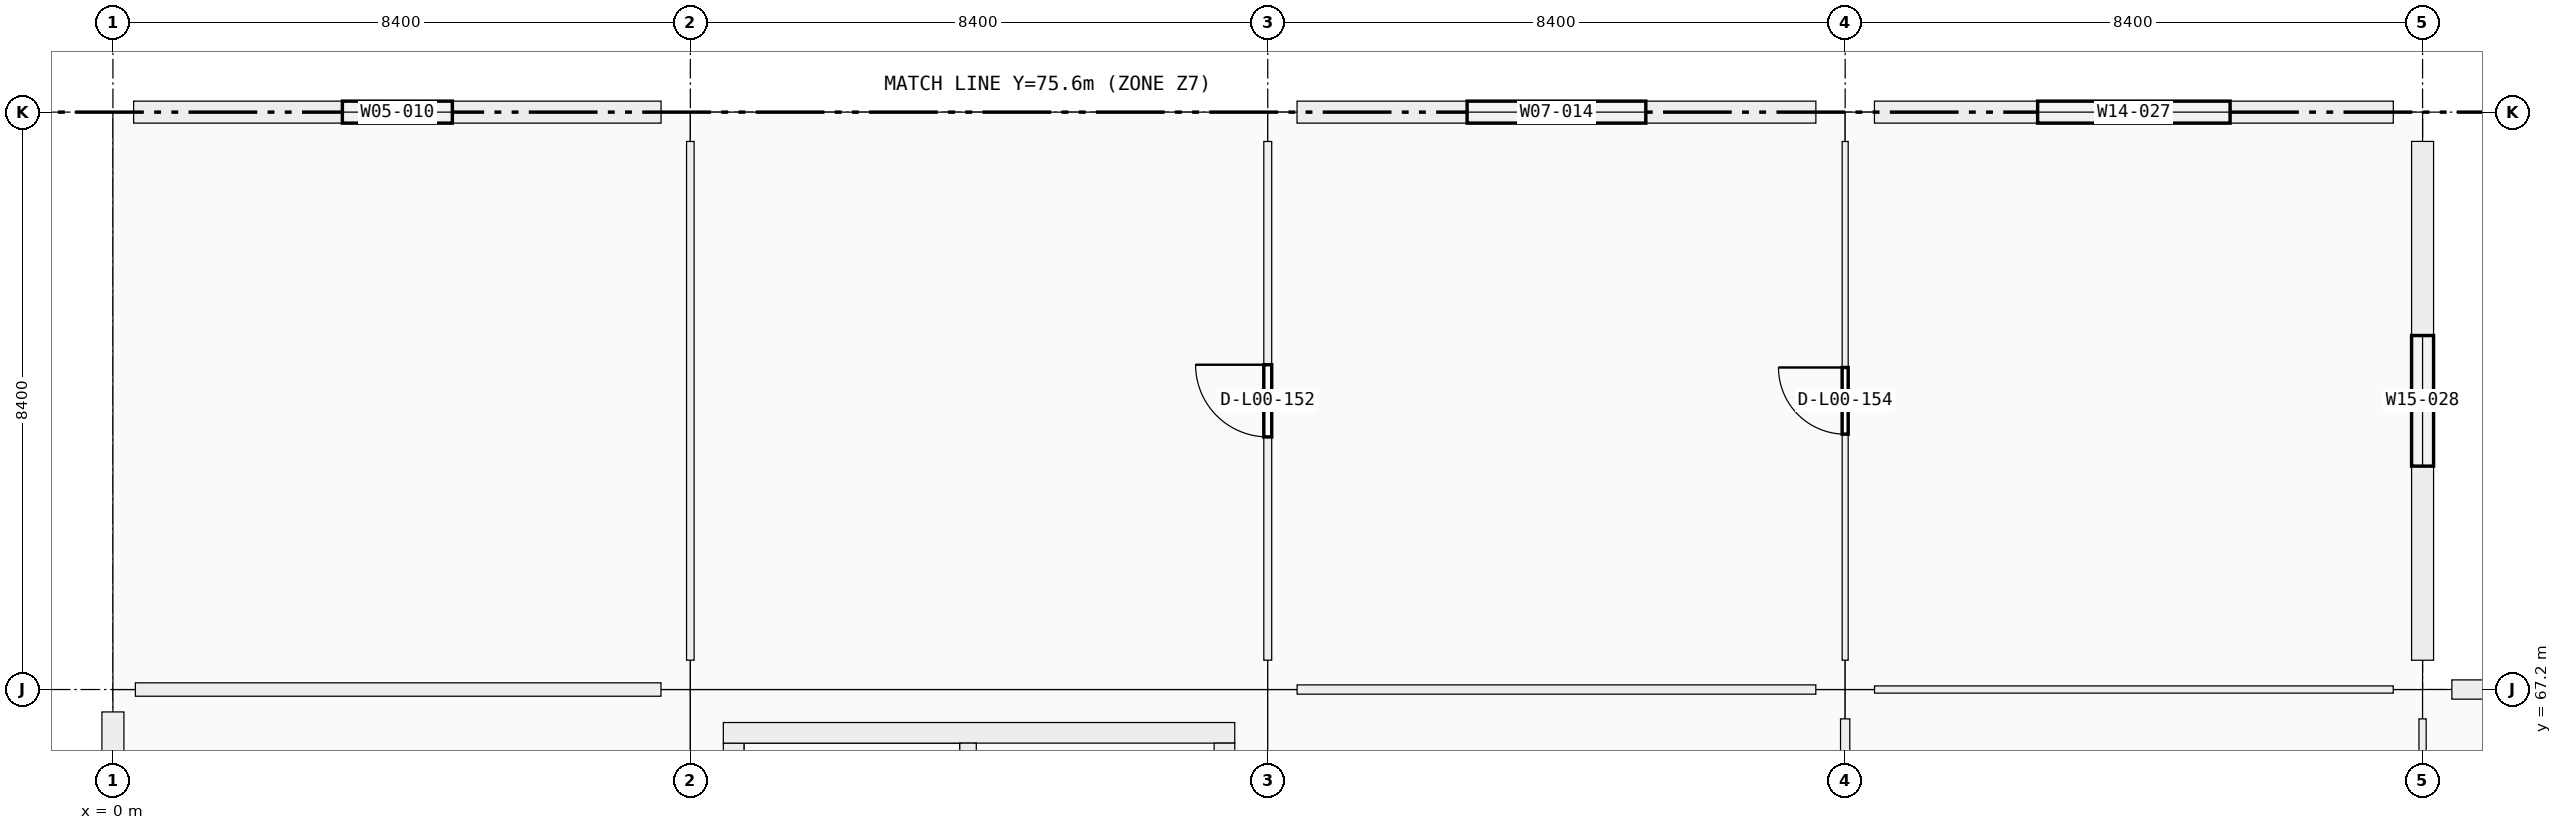
"""IFC4 building model, lengths in metres.
Left out: names, types, materials, properties, quantities, classifications, styles, units other than length and angle.
Written with IfcOpenShell. Run it as: python <this file> out.ifc"""

import sys

from ifc_helpers import new_model, si_unit, direction, frame, frame_2d, origin, origin_2d, place, context, subcontext, project, spatial, rectangle, extrude, element, fill, save


model = new_model("IFC4")
c1 = context("Model", 3, precision=1e-05, world=origin(), true_north=direction((0.0, 1.0)))
c2 = subcontext(c1, "Body", "Model", "MODEL_VIEW")
j1 = project(units=[si_unit("LENGTHUNIT", "METRE"), si_unit("PLANEANGLEUNIT", "RADIAN")], contexts=[c1])
p1 = place(None, origin())
s1 = spatial("IfcSite", under=j1, at=p1, CompositionType="ELEMENT")
p2 = place(p1, origin())
s2 = spatial("IfcBuilding", under=s1, at=p2, CompositionType="ELEMENT")
p3 = place(p2, origin())
s3 = spatial("IfcBuildingStorey", under=s2, at=p3, CompositionType="ELEMENT", Elevation=0.0)
p4 = place(p3, frame((0.0, 67.2, 0.0), z_axis=(0.0, 0.0, 1.0), x_axis=(1.0, 0.0, 0.0)))
e1 = element("IfcColumn", 1, at=p4, inside=s3, PredefinedType="COLUMN", context=c2, shape_type="SweptSolid", body=[
    extrude(rectangle(XDim=0.65, YDim=0.65, at=origin_2d()), origin(), (0.0, 0.0, 1.0), 5.76),
])
p5 = place(p3, frame((0.0, 75.6, 0.0), z_axis=(0.0, 0.0, 1.0), x_axis=(1.0, 0.0, 0.0)))
e2 = element("IfcColumn", 2, at=p5, inside=s3, PredefinedType="COLUMN", context=c2, shape_type="SweptSolid", body=[
    extrude(rectangle(XDim=0.6, YDim=0.6, at=origin_2d()), origin(), (0.0, 0.0, 1.0), 5.76),
])
for number, where, z_axis, x_axis in (
    (3, (8.4, 67.2, 0.0), (0.0, 0.0, 1.0), (1.0, 0.0, 0.0)),
    (4, (8.4, 75.6, 0.0), (0.0, 0.0, 1.0), (1.0, 0.0, 0.0)),
    (5, (16.8, 67.2, 0.0), (0.0, 0.0, 1.0), (1.0, 0.0, 0.0)),
    (6, (16.8, 75.6, 0.0), (0.0, 0.0, 1.0), (1.0, 0.0, 0.0)),
    (7, (25.2, 67.2, 0.0), (0.0, 0.0, 1.0), (1.0, 0.0, 0.0)),
    (8, (25.2, 75.6, 0.0), (0.0, 0.0, 1.0), (1.0, 0.0, 0.0)),
    (9, (33.6, 67.2, 0.0), (0.0, 0.0, 1.0), (1.0, 0.0, 0.0)),
    (10, (33.6, 75.6, 0.0), (0.0, 0.0, 1.0), (1.0, 0.0, 0.0)),
):
    element("IfcColumn", number, at=place(p3, frame(where, z_axis=z_axis, x_axis=x_axis)), inside=s3, PredefinedType="COLUMN", context=c2, shape_type="SweptSolid", body=[
        extrude(rectangle(XDim=0.85, YDim=0.85, at=origin_2d()), origin(), (0.0, 0.0, 1.0), 5.76),
    ])
p6 = place(p3, frame((0.0, 59.101, 0.0), z_axis=(0.0, 0.0, 1.0), x_axis=(0.0, 1.0, 0.0)))
e11 = element("IfcWall", 11, at=p6, inside=s3, PredefinedType="SOLIDWALL", context=c2, shape_type="SweptSolid", body=[
    extrude(rectangle(XDim=7.773, YDim=0.32, at=frame_2d((3.886, 0.0))), origin(), (0.0, 0.0, 1.0), 4.7),
])
p7 = place(p6, frame((3.136, 0.0, 0.9)))
e12 = element("IfcOpeningElement", 12, at=p7, cuts=e11, PredefinedType="OPENING", context=c2, shape_type="SweptSolid", body=[
    extrude(rectangle(XDim=1.5, YDim=1.8, at=frame_2d((0.75, 0.9))), frame((0.0, 0.16, 0.0), z_axis=(0.0, -1.0, 0.0), x_axis=(1.0, 0.0, 0.0)), (0.0, 0.0, 1.0), 0.32),
])
p8 = place(p6, frame((0.149, 0.0, 0.0)))
e13 = element("IfcOpeningElement", 13, at=p8, cuts=e11, PredefinedType="OPENING", context=c2, shape_type="SweptSolid", body=[
    extrude(rectangle(XDim=2.0, YDim=2.25, at=frame_2d((1.0, 1.125))), frame((0.0, 0.16, 0.0), z_axis=(0.0, -1.0, 0.0), x_axis=(1.0, 0.0, 0.0)), (0.0, 0.0, 1.0), 0.32),
])
p9 = place(p3, frame((0.301, 75.6, 0.0), z_axis=(0.0, 0.0, 1.0), x_axis=(1.0, 0.0, 0.0)))
e14 = element("IfcWall", 14, at=p9, inside=s3, PredefinedType="SOLIDWALL", context=c2, shape_type="SweptSolid", body=[
    extrude(rectangle(XDim=7.673, YDim=0.32, at=frame_2d((3.836, 0.0))), origin(), (0.0, 0.0, 1.0), 4.7),
])
p10 = place(p9, frame((3.037, 0.0, 0.9)))
e15 = element("IfcOpeningElement", 15, at=p10, cuts=e14, PredefinedType="OPENING", context=c2, shape_type="SweptSolid", body=[
    extrude(rectangle(XDim=1.6, YDim=2.1, at=frame_2d((0.8, 1.05))), frame((0.0, 0.16, 0.0), z_axis=(0.0, -1.0, 0.0), x_axis=(1.0, 0.0, 0.0)), (0.0, 0.0, 1.0), 0.32),
])
p11 = place(p3, frame((17.226, 75.6, 0.0), z_axis=(0.0, 0.0, 1.0), x_axis=(1.0, 0.0, 0.0)))
e16 = element("IfcWall", 16, at=p11, inside=s3, PredefinedType="SOLIDWALL", context=c2, shape_type="SweptSolid", body=[
    extrude(rectangle(XDim=7.548, YDim=0.32, at=frame_2d((3.774, 0.0))), origin(), (0.0, 0.0, 1.0), 4.7),
])
p12 = place(p11, frame((2.474, 0.0, 0.9)))
e17 = element("IfcOpeningElement", 17, at=p12, cuts=e16, PredefinedType="OPENING", context=c2, shape_type="SweptSolid", body=[
    extrude(rectangle(XDim=2.6, YDim=2.1, at=frame_2d((1.3, 1.05))), frame((0.0, 0.16, 0.0), z_axis=(0.0, -1.0, 0.0), x_axis=(1.0, 0.0, 0.0)), (0.0, 0.0, 1.0), 0.32),
])
p13 = place(p3, frame((25.626, 75.6, 0.0), z_axis=(0.0, 0.0, 1.0), x_axis=(1.0, 0.0, 0.0)))
e18 = element("IfcWall", 18, at=p13, inside=s3, PredefinedType="SOLIDWALL", context=c2, shape_type="SweptSolid", body=[
    extrude(rectangle(XDim=7.548, YDim=0.32, at=frame_2d((3.774, 0.0))), origin(), (0.0, 0.0, 1.0), 4.7),
])
p14 = place(p13, frame((2.374, 0.0, 0.9)))
e19 = element("IfcOpeningElement", 19, at=p14, cuts=e18, PredefinedType="OPENING", context=c2, shape_type="SweptSolid", body=[
    extrude(rectangle(XDim=2.8, YDim=1.75, at=frame_2d((1.4, 0.875))), frame((0.0, 0.16, 0.0), z_axis=(0.0, -1.0, 0.0), x_axis=(1.0, 0.0, 0.0)), (0.0, 0.0, 1.0), 0.32),
])
p15 = place(p3, frame((33.6, 75.174, 0.0), z_axis=(0.0, 0.0, 1.0), x_axis=(0.0, -1.0, 0.0)))
e20 = element("IfcWall", 20, at=p15, inside=s3, PredefinedType="SOLIDWALL", context=c2, shape_type="SweptSolid", body=[
    extrude(rectangle(XDim=7.548, YDim=0.32, at=frame_2d((3.774, 0.0))), origin(), (0.0, 0.0, 1.0), 4.7),
])
p16 = place(p15, frame((2.824, 0.0, 0.9)))
e21 = element("IfcOpeningElement", 21, at=p16, cuts=e20, PredefinedType="OPENING", context=c2, shape_type="SweptSolid", body=[
    extrude(rectangle(XDim=1.9, YDim=1.75, at=frame_2d((0.95, 0.875))), frame((0.0, 0.16, 0.0), z_axis=(0.0, -1.0, 0.0), x_axis=(1.0, 0.0, 0.0)), (0.0, 0.0, 1.0), 0.32),
])
p17 = place(p3, frame((34.026, 67.2, 0.0), z_axis=(0.0, 0.0, 1.0), x_axis=(1.0, 0.0, 0.0)))
e22 = element("IfcWall", 22, at=p17, inside=s3, PredefinedType="SOLIDWALL", context=c2, shape_type="SweptSolid", body=[
    extrude(rectangle(XDim=7.548, YDim=0.28, at=frame_2d((3.774, 0.0))), origin(), (0.0, 0.0, 1.0), 4.7),
])
p18 = place(p17, frame((3.074, 0.0, 0.9)))
e23 = element("IfcOpeningElement", 23, at=p18, cuts=e22, PredefinedType="OPENING", context=c2, shape_type="SweptSolid", body=[
    extrude(rectangle(XDim=1.4, YDim=1.75, at=frame_2d((0.7, 0.875))), frame((0.0, 0.14, 0.0), z_axis=(0.0, -1.0, 0.0), x_axis=(1.0, 0.0, 0.0)), (0.0, 0.0, 1.0), 0.28),
])
p19 = place(p3, frame((9.03, 59.58, 0.0), z_axis=(0.0, 0.0, 1.0), x_axis=(0.0, 1.0, 0.0)))
e24 = element("IfcWall", 24, at=p19, inside=s3, PredefinedType="SHEAR", context=c2, shape_type="SweptSolid", body=[
    extrude(rectangle(XDim=6.84, YDim=0.3, at=frame_2d((3.42, 0.0))), origin(), (0.0, 0.0, 1.0), 5.76),
])
p20 = place(p19, frame((0.12, 0.0, 0.0)))
e25 = element("IfcOpeningElement", 25, at=p20, cuts=e24, PredefinedType="OPENING", context=c2, shape_type="SweptSolid", body=[
    extrude(rectangle(XDim=1.0, YDim=2.15, at=frame_2d((0.5, 1.075))), frame((0.0, 0.15, 0.0), z_axis=(0.0, -1.0, 0.0), x_axis=(1.0, 0.0, 0.0)), (0.0, 0.0, 1.0), 0.3),
])
p21 = place(p3, frame((8.88, 66.57, 0.0), z_axis=(0.0, 0.0, 1.0), x_axis=(1.0, 0.0, 0.0)))
e26 = element("IfcWall", 26, at=p21, inside=s3, PredefinedType="SHEAR", context=c2, shape_type="SweptSolid", body=[
    extrude(rectangle(XDim=7.44, YDim=0.3, at=frame_2d((3.72, 0.0))), origin(), (0.0, 0.0, 1.0), 5.76),
])
p22 = place(p3, frame((16.17, 66.42, 0.0), z_axis=(0.0, 0.0, 1.0), x_axis=(0.0, -1.0, 0.0)))
e27 = element("IfcWall", 27, at=p22, inside=s3, PredefinedType="SHEAR", context=c2, shape_type="SweptSolid", body=[
    extrude(rectangle(XDim=6.84, YDim=0.3, at=frame_2d((3.42, 0.0))), origin(), (0.0, 0.0, 1.0), 5.76),
])
p23 = place(p3, frame((12.44, 59.58, 0.0), z_axis=(0.0, 0.0, 1.0), x_axis=(0.0, 1.0, 0.0)))
e28 = element("IfcWall", 28, at=p23, inside=s3, PredefinedType="SHEAR", context=c2, shape_type="SweptSolid", body=[
    extrude(rectangle(XDim=6.84, YDim=0.24, at=frame_2d((3.42, 0.0))), origin(), (0.0, 0.0, 1.0), 5.76),
])
p24 = place(p23, frame((0.12, 0.0, 0.0)))
e29 = element("IfcOpeningElement", 29, at=p24, cuts=e28, PredefinedType="OPENING", context=c2, shape_type="SweptSolid", body=[
    extrude(rectangle(XDim=1.0, YDim=2.15, at=frame_2d((0.5, 1.075))), frame((0.0, 0.12, 0.0), z_axis=(0.0, -1.0, 0.0), x_axis=(1.0, 0.0, 0.0)), (0.0, 0.0, 1.0), 0.24),
])
p25 = place(p3, frame((0.327, 67.2, 0.0), z_axis=(0.0, 0.0, 1.0), x_axis=(1.0, 0.0, 0.0)))
e30 = element("IfcWall", 30, at=p25, inside=s3, PredefinedType="PARTITIONING", context=c2, shape_type="SweptSolid", body=[
    extrude(rectangle(XDim=7.646, YDim=0.195, at=frame_2d((3.823, 0.0))), origin(), (0.0, 0.0, 1.0), 3.66),
])
p26 = place(p25, frame((3.313, 0.0, 0.0)))
e31 = element("IfcOpeningElement", 31, at=p26, cuts=e30, PredefinedType="OPENING", context=c2, shape_type="SweptSolid", body=[
    extrude(rectangle(XDim=1.02, YDim=2.2, at=frame_2d((0.51, 1.1))), frame((0.0, 0.098, 0.0), z_axis=(0.0, -1.0, 0.0), x_axis=(1.0, 0.0, 0.0)), (0.0, 0.0, 1.0), 0.195),
])
p27 = place(p3, frame((17.227, 67.2, 0.0), z_axis=(0.0, 0.0, 1.0), x_axis=(1.0, 0.0, 0.0)))
e32 = element("IfcWall", 32, at=p27, inside=s3, PredefinedType="PARTITIONING", context=c2, shape_type="SweptSolid", body=[
    extrude(rectangle(XDim=7.546, YDim=0.135, at=frame_2d((3.773, 0.0))), origin(), (0.0, 0.0, 1.0), 3.66),
])
p28 = place(p27, frame((3.283, 0.0, 0.0)))
e33 = element("IfcOpeningElement", 33, at=p28, cuts=e32, PredefinedType="OPENING", context=c2, shape_type="SweptSolid", body=[
    extrude(rectangle(XDim=0.98, YDim=2.18, at=frame_2d((0.49, 1.09))), frame((0.0, 0.067, 0.0), z_axis=(0.0, -1.0, 0.0), x_axis=(1.0, 0.0, 0.0)), (0.0, 0.0, 1.0), 0.135),
])
p29 = place(p3, frame((25.627, 67.2, 0.0), z_axis=(0.0, 0.0, 1.0), x_axis=(1.0, 0.0, 0.0)))
e34 = element("IfcWall", 34, at=p29, inside=s3, PredefinedType="PARTITIONING", context=c2, shape_type="SweptSolid", body=[
    extrude(rectangle(XDim=7.546, YDim=0.105, at=frame_2d((3.773, 0.0))), origin(), (0.0, 0.0, 1.0), 3.66),
])
p30 = place(p29, frame((3.248, 0.0, 0.0)))
e35 = element("IfcOpeningElement", 35, at=p30, cuts=e34, PredefinedType="OPENING", context=c2, shape_type="SweptSolid", body=[
    extrude(rectangle(XDim=1.05, YDim=2.12, at=frame_2d((0.525, 1.06))), frame((0.0, 0.052, 0.0), z_axis=(0.0, -1.0, 0.0), x_axis=(1.0, 0.0, 0.0)), (0.0, 0.0, 1.0), 0.105),
])
p31 = place(p3, frame((8.4, 67.627, 0.0), z_axis=(0.0, 0.0, 1.0), x_axis=(0.0, 1.0, 0.0)))
e36 = element("IfcWall", 36, at=p31, inside=s3, PredefinedType="MOVABLE", context=c2, shape_type="SweptSolid", body=[
    extrude(rectangle(XDim=7.546, YDim=0.11, at=frame_2d((3.773, 0.0))), origin(), (0.0, 0.0, 1.0), 3.66),
])
p32 = place(p31, frame((3.273, 0.0, 0.0)))
e37 = element("IfcOpeningElement", 37, at=p32, cuts=e36, PredefinedType="OPENING", context=c2, shape_type="SweptSolid", body=[
    extrude(rectangle(XDim=1.0, YDim=2.2, at=frame_2d((0.5, 1.1))), frame((0.0, 0.055, 0.0), z_axis=(0.0, -1.0, 0.0), x_axis=(1.0, 0.0, 0.0)), (0.0, 0.0, 1.0), 0.11),
])
p33 = place(p3, frame((16.8, 67.627, 0.0), z_axis=(0.0, 0.0, 1.0), x_axis=(0.0, 1.0, 0.0)))
e38 = element("IfcWall", 38, at=p33, inside=s3, PredefinedType="PARTITIONING", context=c2, shape_type="SweptSolid", body=[
    extrude(rectangle(XDim=7.546, YDim=0.115, at=frame_2d((3.773, 0.0))), origin(), (0.0, 0.0, 1.0), 3.66),
])
p34 = place(p33, frame((3.248, 0.0, 0.0)))
e39 = element("IfcOpeningElement", 39, at=p34, cuts=e38, PredefinedType="OPENING", context=c2, shape_type="SweptSolid", body=[
    extrude(rectangle(XDim=1.05, YDim=2.12, at=frame_2d((0.525, 1.06))), frame((0.0, 0.058, 0.0), z_axis=(0.0, -1.0, 0.0), x_axis=(1.0, 0.0, 0.0)), (0.0, 0.0, 1.0), 0.115),
])
p35 = place(p3, frame((25.2, 59.227, 0.0), z_axis=(0.0, 0.0, 1.0), x_axis=(0.0, 1.0, 0.0)))
e40 = element("IfcWall", 40, at=p35, inside=s3, PredefinedType="PARTITIONING", context=c2, shape_type="SweptSolid", body=[
    extrude(rectangle(XDim=7.546, YDim=0.135, at=frame_2d((3.773, 0.0))), origin(), (0.0, 0.0, 1.0), 3.66),
])
p36 = place(p35, frame((3.313, 0.0, 0.0)))
e41 = element("IfcOpeningElement", 41, at=p36, cuts=e40, PredefinedType="OPENING", context=c2, shape_type="SweptSolid", body=[
    extrude(rectangle(XDim=0.92, YDim=2.15, at=frame_2d((0.46, 1.075))), frame((0.0, 0.067, 0.0), z_axis=(0.0, -1.0, 0.0), x_axis=(1.0, 0.0, 0.0)), (0.0, 0.0, 1.0), 0.135),
])
p37 = place(p3, frame((25.2, 67.627, 0.0), z_axis=(0.0, 0.0, 1.0), x_axis=(0.0, 1.0, 0.0)))
e42 = element("IfcWall", 42, at=p37, inside=s3, PredefinedType="PARTITIONING", context=c2, shape_type="SweptSolid", body=[
    extrude(rectangle(XDim=7.546, YDim=0.088, at=frame_2d((3.773, 0.0))), origin(), (0.0, 0.0, 1.0), 3.66),
])
p38 = place(p37, frame((3.288, 0.0, 0.0)))
e43 = element("IfcOpeningElement", 43, at=p38, cuts=e42, PredefinedType="OPENING", context=c2, shape_type="SweptSolid", body=[
    extrude(rectangle(XDim=0.97, YDim=2.12, at=frame_2d((0.485, 1.06))), frame((0.0, 0.044, 0.0), z_axis=(0.0, -1.0, 0.0), x_axis=(1.0, 0.0, 0.0)), (0.0, 0.0, 1.0), 0.088),
])
p39 = place(p3, frame((33.6, 59.227, 0.0), z_axis=(0.0, 0.0, 1.0), x_axis=(0.0, 1.0, 0.0)))
e44 = element("IfcWall", 44, at=p39, inside=s3, PredefinedType="PARTITIONING", context=c2, shape_type="SweptSolid", body=[
    extrude(rectangle(XDim=7.546, YDim=0.105, at=frame_2d((3.773, 0.0))), origin(), (0.0, 0.0, 1.0), 3.66),
])
p40 = place(p39, frame((3.073, 0.0, 0.0)))
e45 = element("IfcOpeningElement", 45, at=p40, cuts=e44, PredefinedType="OPENING", context=c2, shape_type="SweptSolid", body=[
    extrude(rectangle(XDim=1.4, YDim=2.25, at=frame_2d((0.7, 1.125))), frame((0.0, 0.052, 0.0), z_axis=(0.0, -1.0, 0.0), x_axis=(1.0, 0.0, 0.0)), (0.0, 0.0, 1.0), 0.105),
])
p41 = place(p10, origin())
e46 = element("IfcWindow", 46, at=p41, inside=s3, PartitioningType="SINGLE_PANEL", PredefinedType="WINDOW", context=c2, shape_type="SweptSolid", body=[
    extrude(rectangle(XDim=1.6, YDim=2.1, at=frame_2d((0.8, 1.05))), frame((0.0, 0.03, 0.0), z_axis=(0.0, -1.0, 0.0), x_axis=(1.0, 0.0, 0.0)), (0.0, 0.0, 1.0), 0.06),
])
fill(e15, e46)
p42 = place(p12, origin())
e47 = element("IfcWindow", 47, at=p42, inside=s3, PartitioningType="SINGLE_PANEL", PredefinedType="WINDOW", context=c2, shape_type="SweptSolid", body=[
    extrude(rectangle(XDim=2.6, YDim=2.1, at=frame_2d((1.3, 1.05))), frame((0.0, 0.03, 0.0), z_axis=(0.0, -1.0, 0.0), x_axis=(1.0, 0.0, 0.0)), (0.0, 0.0, 1.0), 0.06),
])
fill(e17, e47)
p43 = place(p14, origin())
e48 = element("IfcWindow", 48, at=p43, inside=s3, PartitioningType="SINGLE_PANEL", PredefinedType="WINDOW", context=c2, shape_type="SweptSolid", body=[
    extrude(rectangle(XDim=2.8, YDim=1.75, at=frame_2d((1.4, 0.875))), frame((0.0, 0.03, 0.0), z_axis=(0.0, -1.0, 0.0), x_axis=(1.0, 0.0, 0.0)), (0.0, 0.0, 1.0), 0.06),
])
fill(e19, e48)
p44 = place(p16, origin())
e49 = element("IfcWindow", 49, at=p44, inside=s3, PartitioningType="SINGLE_PANEL", PredefinedType="WINDOW", context=c2, shape_type="SweptSolid", body=[
    extrude(rectangle(XDim=1.9, YDim=1.75, at=frame_2d((0.95, 0.875))), frame((0.0, 0.03, 0.0), z_axis=(0.0, -1.0, 0.0), x_axis=(1.0, 0.0, 0.0)), (0.0, 0.0, 1.0), 0.06),
])
fill(e21, e49)
p45 = place(p28, origin())
e50 = element("IfcDoor", 50, at=p45, inside=s3, OperationType="SINGLE_SWING_RIGHT", PredefinedType="DOOR", context=c2, shape_type="SweptSolid", body=[
    extrude(rectangle(XDim=0.98, YDim=2.18, at=frame_2d((0.49, 1.09))), frame((0.0, 0.025, 0.0), z_axis=(0.0, -1.0, 0.0), x_axis=(1.0, 0.0, 0.0)), (0.0, 0.0, 1.0), 0.05),
])
fill(e33, e50)
p46 = place(p26, origin())
e51 = element("IfcDoor", 51, at=p46, inside=s3, OperationType="SINGLE_SWING_LEFT", PredefinedType="DOOR", context=c2, shape_type="SweptSolid", body=[
    extrude(rectangle(XDim=1.02, YDim=2.2, at=frame_2d((0.51, 1.1))), frame((0.0, 0.025, 0.0), z_axis=(0.0, -1.0, 0.0), x_axis=(1.0, 0.0, 0.0)), (0.0, 0.0, 1.0), 0.05),
])
fill(e31, e51)
p47 = place(p30, origin())
e52 = element("IfcDoor", 52, at=p47, inside=s3, OperationType="SINGLE_SWING_LEFT", PredefinedType="DOOR", context=c2, shape_type="SweptSolid", body=[
    extrude(rectangle(XDim=1.05, YDim=2.12, at=frame_2d((0.525, 1.06))), frame((0.0, 0.025, 0.0), z_axis=(0.0, -1.0, 0.0), x_axis=(1.0, 0.0, 0.0)), (0.0, 0.0, 1.0), 0.05),
])
fill(e35, e52)
p48 = place(p32, origin())
e53 = element("IfcDoor", 53, at=p48, inside=s3, OperationType="SINGLE_SWING_RIGHT", PredefinedType="DOOR", context=c2, shape_type="SweptSolid", body=[
    extrude(rectangle(XDim=1.0, YDim=2.2, at=frame_2d((0.5, 1.1))), frame((0.0, 0.025, 0.0), z_axis=(0.0, -1.0, 0.0), x_axis=(1.0, 0.0, 0.0)), (0.0, 0.0, 1.0), 0.05),
])
fill(e37, e53)
p49 = place(p34, origin())
e54 = element("IfcDoor", 54, at=p49, inside=s3, OperationType="SINGLE_SWING_RIGHT", PredefinedType="DOOR", context=c2, shape_type="SweptSolid", body=[
    extrude(rectangle(XDim=1.05, YDim=2.12, at=frame_2d((0.525, 1.06))), frame((0.0, 0.025, 0.0), z_axis=(0.0, -1.0, 0.0), x_axis=(1.0, 0.0, 0.0)), (0.0, 0.0, 1.0), 0.05),
])
fill(e39, e54)
p50 = place(p38, origin())
e55 = element("IfcDoor", 55, at=p50, inside=s3, OperationType="SINGLE_SWING_RIGHT", PredefinedType="DOOR", context=c2, shape_type="SweptSolid", body=[
    extrude(rectangle(XDim=0.97, YDim=2.12, at=frame_2d((0.485, 1.06))), frame((0.0, 0.025, 0.0), z_axis=(0.0, -1.0, 0.0), x_axis=(1.0, 0.0, 0.0)), (0.0, 0.0, 1.0), 0.05),
])
fill(e43, e55)
save(model, sys.argv[1])
